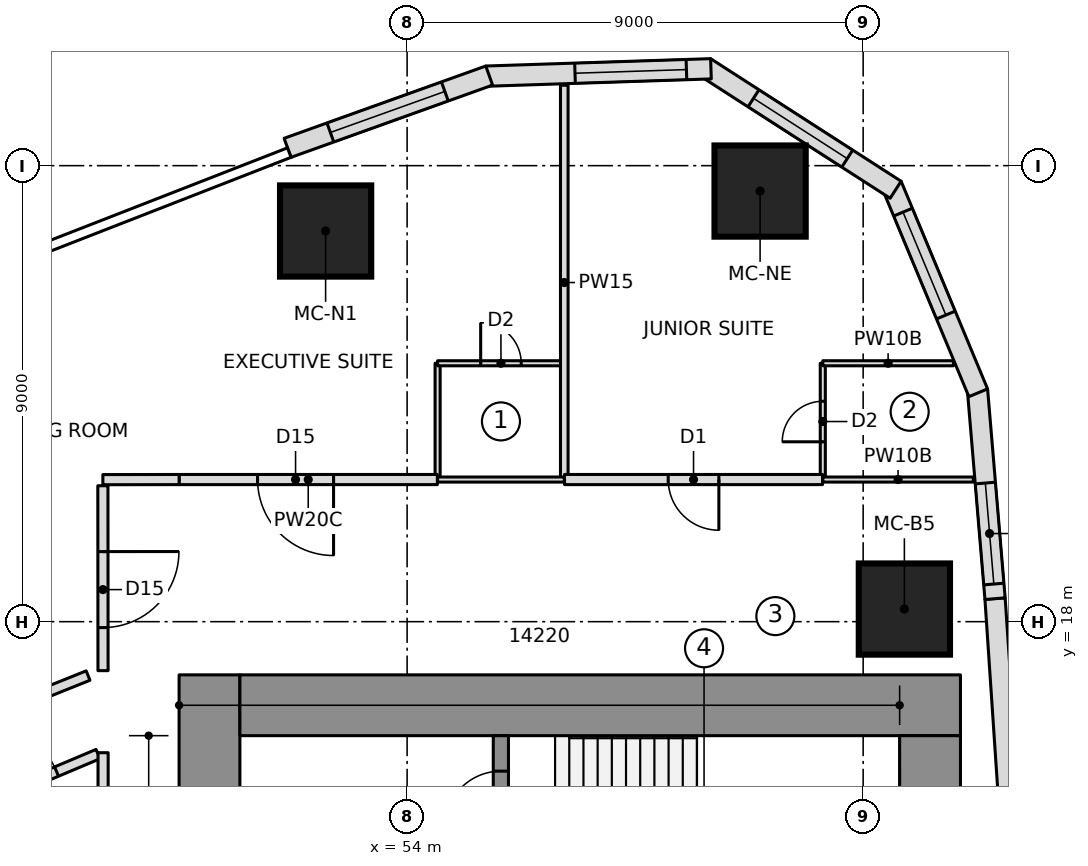
"""IFC4 building model, lengths in metres.
Left out: names, types, materials, properties, quantities, classifications, styles, units other than length and angle.
Written with IfcOpenShell. Run it as: python <this file> out.ifc"""

import sys

from ifc_helpers import new_model, si_unit, direction, frame, frame_2d, origin, origin_2d, place, context, subcontext, project, spatial, polyline, rectangle, outline, extrude, element, fill, save


model = new_model("IFC4")
c1 = context("Model", 3, precision=1e-05, world=origin(), true_north=direction((0.0, 1.0)))
c2 = subcontext(c1, "Body", "Model", "MODEL_VIEW")
j1 = project(units=[si_unit("LENGTHUNIT", "METRE"), si_unit("PLANEANGLEUNIT", "RADIAN")], contexts=[c1])
p1 = place(None, origin())
s1 = spatial("IfcSite", under=j1, at=p1, CompositionType="ELEMENT")
p2 = place(p1, origin())
s2 = spatial("IfcBuilding", under=s1, at=p2, CompositionType="ELEMENT")
p3 = place(p2, frame((0.0, 0.0, 46.7)))
s3 = spatial("IfcBuildingStorey", under=s2, at=p3, CompositionType="ELEMENT", Elevation=46.7)
p4 = place(p3, frame((50.1, 6.65, 0.0), z_axis=(0.0, 0.0, 1.0), x_axis=(0.0, 1.0, 0.0)))
e1 = element("IfcWall", 1, at=p4, inside=s3, PredefinedType="SHEAR", context=c2, shape_type="SweptSolid", body=[
    extrude(rectangle(XDim=10.3, YDim=1.2, at=frame_2d((5.15, 0.0))), origin(), (0.0, 0.0, 1.0), 3.55),
])
p5 = place(p4, frame((6.5, 0.0, 0.0)))
e2 = element("IfcOpeningElement", 2, at=p5, cuts=e1, PredefinedType="OPENING", context=c2, shape_type="SweptSolid", body=[
    extrude(rectangle(XDim=1.1, YDim=2.1, at=frame_2d((0.55, 1.05))), frame((0.0, 0.61, 0.0), z_axis=(0.0, -1.0, 0.0), x_axis=(1.0, 0.0, 0.0)), (0.0, 0.0, 1.0), 1.22),
])
p6 = place(p3, frame((50.7, 16.35, 0.0), z_axis=(0.0, 0.0, 1.0), x_axis=(1.0, 0.0, 0.0)))
e3 = element("IfcWall", 3, at=p6, inside=s3, PredefinedType="SHEAR", context=c2, shape_type="SweptSolid", body=[
    extrude(rectangle(XDim=14.22, YDim=1.2, at=frame_2d((7.11, 0.0))), origin(), (0.0, 0.0, 1.0), 3.55),
])
p7 = place(p3, frame((64.32, 9.95, 0.0), z_axis=(0.0, 0.0, 1.0), x_axis=(0.0, 1.0, 0.0)))
e4 = element("IfcWall", 4, at=p7, inside=s3, PredefinedType="SHEAR", context=c2, shape_type="SweptSolid", body=[
    extrude(rectangle(XDim=5.8, YDim=1.2, at=frame_2d((2.9, 0.0))), origin(), (0.0, 0.0, 1.0), 3.55),
])
p8 = place(p3, frame((55.85, 10.35, 0.0), z_axis=(0.0, 0.0, 1.0), x_axis=(0.0, 1.0, 0.0)))
e5 = element("IfcWall", 5, at=p8, inside=s3, PredefinedType="SHEAR", context=c2, shape_type="SweptSolid", body=[
    extrude(rectangle(XDim=5.4, YDim=0.3, at=frame_2d((2.7, 0.0))), origin(), (0.0, 0.0, 1.0), 3.55),
])
p9 = place(p8, frame((1.43, 0.0, 0.0)))
e6 = element("IfcOpeningElement", 6, at=p9, cuts=e5, PredefinedType="OPENING", context=c2, shape_type="SweptSolid", body=[
    extrude(rectangle(XDim=1.1, YDim=2.1, at=frame_2d((0.55, 1.05))), frame((0.0, 0.16, 0.0), z_axis=(0.0, -1.0, 0.0), x_axis=(1.0, 0.0, 0.0)), (0.0, 0.0, 1.0), 0.32),
])
p10 = place(p8, frame((3.6, 0.0, 0.0)))
e7 = element("IfcOpeningElement", 7, at=p10, cuts=e5, PredefinedType="OPENING", context=c2, shape_type="SweptSolid", body=[
    extrude(rectangle(XDim=1.1, YDim=2.1, at=frame_2d((0.55, 1.05))), frame((0.0, 0.16, 0.0), z_axis=(0.0, -1.0, 0.0), x_axis=(1.0, 0.0, 0.0)), (0.0, 0.0, 1.0), 0.32),
])
for number, where, z_axis, x_axis in (
    (8, (63.813, 18.249, 0.0), (0.0, 0.0, 1.0), (1.0, 0.0, 0.0)),
    (9, (60.966, 26.499, 0.0), (0.0, 0.0, 1.0), (1.0, 0.0, 0.0)),
    (10, (52.392, 25.71, 0.0), (0.0, 0.0, 1.0), (1.0, 0.0, 0.0)),
):
    element("IfcColumn", number, at=place(p3, frame(where, z_axis=z_axis, x_axis=x_axis)), inside=s3, PredefinedType="COLUMN", context=c2, shape_type="SweptSolid", body=[
        extrude(rectangle(XDim=1.8, YDim=1.8, at=origin_2d()), origin(), (0.0, 0.0, 1.0), 3.55),
    ])
p11 = place(p3, frame((65.878, 14.36, 0.0), z_axis=(0.0, 0.0, 1.0), x_axis=(-0.067087430225, 0.997747100575, 0.0)))
e11 = element("IfcWall", 11, at=p11, inside=s3, PredefinedType="NOTDEFINED", context=c2, shape_type="SweptSolid", body=[
    extrude(outline(polyline([(-0.002, -0.2), (4.107, -0.2), (4.103, 0.2), (0.002, 0.2), (-0.002, -0.2)])), origin(), (0.0, 0.0, 1.0), 3.25),
])
p12 = place(p3, frame((65.603, 18.455, 0.0), z_axis=(0.0, 0.0, 1.0), x_axis=(-0.083793550906, 0.996483136248, 0.0)))
e12 = element("IfcWall", 12, at=p12, inside=s3, PredefinedType="NOTDEFINED", context=c2, shape_type="SweptSolid", body=[
    extrude(outline(polyline([(-0.002, -0.2), (4.136, -0.2), (4.074, 0.2), (0.002, 0.2), (-0.002, -0.2)])), origin(), (0.0, 0.0, 1.0), 3.25),
])
p13 = place(p12, frame((0.288, 0.0, 0.5)))
e13 = element("IfcOpeningElement", 13, at=p13, cuts=e12, PredefinedType="OPENING", context=c2, shape_type="SweptSolid", body=[
    extrude(rectangle(XDim=2.0, YDim=2.0, at=frame_2d((1.0, 1.0))), frame((0.0, 0.21, 0.0), z_axis=(0.0, -1.0, 0.0), x_axis=(1.0, 0.0, 0.0)), (0.0, 0.0, 1.0), 0.42),
])
p14 = place(p3, frame((65.259, 22.546, 0.0), z_axis=(0.0, 0.0, 1.0), x_axis=(-0.384372042685, 0.923178277908, 0.0)))
e14 = element("IfcWall", 14, at=p14, inside=s3, PredefinedType="NOTDEFINED", context=c2, shape_type="SweptSolid", body=[
    extrude(outline(polyline([(-0.031, -0.2), (4.408, -0.2), (4.283, 0.2), (0.031, 0.2), (-0.031, -0.2)])), origin(), (0.0, 0.0, 1.0), 3.25),
])
p15 = place(p14, frame((1.631, 0.0, 0.6)))
e15 = element("IfcOpeningElement", 15, at=p15, cuts=e14, PredefinedType="OPENING", context=c2, shape_type="SweptSolid", body=[
    extrude(outline(polyline([(0.0, 1.35), (0.084, 1.771), (0.322, 2.128), (0.679, 2.366), (1.1, 2.45), (1.521, 2.366), (1.878, 2.128), (2.116, 1.771), (2.2, 1.35), (2.2, 1.1), (2.116, 0.679), (1.878, 0.322), (1.521, 0.084), (1.1, 0.0), (0.679, 0.084), (0.322, 0.322), (0.084, 0.679), (0.0, 1.1), (0.0, 1.35)])), frame((0.0, 0.21, 0.0), z_axis=(0.0, -1.0, 0.0), x_axis=(1.0, 0.0, 0.0)), (0.0, 0.0, 1.0), 0.42),
])
p16 = place(p3, frame((63.588, 26.558, 0.0), z_axis=(0.0, 0.0, 1.0), x_axis=(-0.840937468718, 0.541132307025, 0.0)))
e16 = element("IfcWall", 16, at=p16, inside=s3, PredefinedType="NOTDEFINED", context=c2, shape_type="SweptSolid", body=[
    extrude(outline(polyline([(-0.062, -0.2), (4.409, -0.2), (4.284, 0.2), (0.062, 0.2), (-0.062, -0.2)])), origin(), (0.0, 0.0, 1.0), 3.25),
])
p17 = place(p16, frame((1.073, 0.0, 0.6)))
e17 = element("IfcOpeningElement", 17, at=p17, cuts=e16, PredefinedType="OPENING", context=c2, shape_type="SweptSolid", body=[
    extrude(outline(polyline([(0.0, 1.35), (0.084, 1.771), (0.322, 2.128), (0.679, 2.366), (1.1, 2.45), (1.521, 2.366), (1.878, 2.128), (2.116, 1.771), (2.2, 1.35), (2.2, 1.1), (2.116, 0.679), (1.878, 0.322), (1.521, 0.084), (1.1, 0.0), (0.679, 0.084), (0.322, 0.322), (0.084, 0.679), (0.0, 1.1), (0.0, 1.35)])), frame((0.0, 0.21, 0.0), z_axis=(0.0, -1.0, 0.0), x_axis=(1.0, 0.0, 0.0)), (0.0, 0.0, 1.0), 0.42),
])
p18 = place(p3, frame((59.934, 28.91, 0.0), z_axis=(0.0, 0.0, 1.0), x_axis=(-0.999463576228, -0.032749958686, 0.0)))
e18 = element("IfcWall", 18, at=p18, inside=s3, PredefinedType="NOTDEFINED", context=c2, shape_type="SweptSolid", body=[
    extrude(outline(polyline([(-0.062, -0.2), (4.378, -0.2), (4.315, 0.2), (0.062, 0.2), (-0.062, -0.2)])), origin(), (0.0, 0.0, 1.0), 3.25),
])
p19 = place(p18, frame((0.422, 0.0, 0.6)))
e19 = element("IfcOpeningElement", 19, at=p19, cuts=e18, PredefinedType="OPENING", context=c2, shape_type="SweptSolid", body=[
    extrude(outline(polyline([(0.0, 1.35), (0.084, 1.771), (0.322, 2.128), (0.679, 2.366), (1.1, 2.45), (1.521, 2.366), (1.878, 2.128), (2.116, 1.771), (2.2, 1.35), (2.2, 1.1), (2.116, 0.679), (1.878, 0.322), (1.521, 0.084), (1.1, 0.0), (0.679, 0.084), (0.322, 0.322), (0.084, 0.679), (0.0, 1.1), (0.0, 1.35)])), frame((0.0, 0.21, 0.0), z_axis=(0.0, -1.0, 0.0), x_axis=(1.0, 0.0, 0.0)), (0.0, 0.0, 1.0), 0.42),
])
p20 = place(p3, frame((55.59, 28.768, 0.0), z_axis=(0.0, 0.0, 1.0), x_axis=(-0.941339752885, -0.337460323057, 0.0)))
e20 = element("IfcWall", 20, at=p20, inside=s3, PredefinedType="NOTDEFINED", context=c2, shape_type="SweptSolid", body=[
    extrude(outline(polyline([(-0.031, -0.2), (4.196, -0.2), (4.196, 0.2), (0.031, 0.2), (-0.031, -0.2)])), origin(), (0.0, 0.0, 1.0), 3.25),
])
p21 = place(p20, frame((0.898, 0.0, 0.5)))
e21 = element("IfcOpeningElement", 21, at=p21, cuts=e20, PredefinedType="OPENING", context=c2, shape_type="SweptSolid", body=[
    extrude(rectangle(XDim=2.4, YDim=2.0, at=frame_2d((1.2, 1.0))), frame((0.0, 0.21, 0.0), z_axis=(0.0, -1.0, 0.0), x_axis=(1.0, 0.0, 0.0)), (0.0, 0.0, 1.0), 0.42),
])
p22 = place(p3, frame((54.602, 20.8, 0.0), z_axis=(0.0, 0.0, 1.0), x_axis=(0.0, 1.0, 0.0)))
e22 = element("IfcWall", 22, at=p22, inside=s3, PredefinedType="PARTITIONING", context=c2, shape_type="SweptSolid", body=[
    extrude(rectangle(XDim=2.3, YDim=0.1, at=frame_2d((1.15, 0.0))), origin(), (0.0, 0.0, 1.0), 3.25),
])
p23 = place(p3, frame((54.602, 23.1, 0.0), z_axis=(0.0, 0.0, 1.0), x_axis=(1.0, 0.0, 0.0)))
e23 = element("IfcWall", 23, at=p23, inside=s3, PredefinedType="PARTITIONING", context=c2, shape_type="SweptSolid", body=[
    extrude(rectangle(XDim=2.5, YDim=0.1, at=frame_2d((1.25, 0.0))), origin(), (0.0, 0.0, 1.0), 3.25),
])
p24 = place(p23, frame((0.85, 0.0, 0.0)))
e24 = element("IfcOpeningElement", 24, at=p24, cuts=e23, PredefinedType="OPENING", context=c2, shape_type="SweptSolid", body=[
    extrude(rectangle(XDim=0.8, YDim=2.1, at=frame_2d((0.4, 1.05))), frame((0.0, 0.06, 0.0), z_axis=(0.0, -1.0, 0.0), x_axis=(1.0, 0.0, 0.0)), (0.0, 0.0, 1.0), 0.12),
])
p25 = place(p3, frame((62.203, 20.8, 0.0), z_axis=(0.0, 0.0, 1.0), x_axis=(0.0, 1.0, 0.0)))
e25 = element("IfcWall", 25, at=p25, inside=s3, PredefinedType="PARTITIONING", context=c2, shape_type="SweptSolid", body=[
    extrude(rectangle(XDim=2.3, YDim=0.1, at=frame_2d((1.15, 0.0))), origin(), (0.0, 0.0, 1.0), 3.25),
])
p26 = place(p25, frame((0.75, 0.0, 0.0)))
e26 = element("IfcOpeningElement", 26, at=p26, cuts=e25, PredefinedType="OPENING", context=c2, shape_type="SweptSolid", body=[
    extrude(rectangle(XDim=0.8, YDim=2.1, at=frame_2d((0.4, 1.05))), frame((0.0, 0.06, 0.0), z_axis=(0.0, -1.0, 0.0), x_axis=(1.0, 0.0, 0.0)), (0.0, 0.0, 1.0), 0.12),
])
p27 = place(p3, frame((62.203, 23.1, 0.0), z_axis=(0.0, 0.0, 1.0), x_axis=(1.0, 0.0, 0.0)))
e27 = element("IfcWall", 27, at=p27, inside=s3, PredefinedType="PARTITIONING", context=c2, shape_type="SweptSolid", body=[
    extrude(rectangle(XDim=2.578, YDim=0.1, at=frame_2d((1.289, 0.0))), origin(), (0.0, 0.0, 1.0), 3.25),
])
p28 = place(p3, frame((57.102, 20.8, 0.0), z_axis=(0.0, 0.0, 1.0), x_axis=(0.0, 1.0, 0.0)))
e28 = element("IfcWall", 28, at=p28, inside=s3, PredefinedType="PARTITIONING", context=c2, shape_type="SweptSolid", body=[
    extrude(rectangle(XDim=7.787, YDim=0.15, at=frame_2d((3.894, 0.0))), origin(), (0.0, 0.0, 1.0), 3.25),
])
p29 = place(p3, frame((43.85, 13.677, 0.0), z_axis=(0.0, 0.0, 1.0), x_axis=(0.921265924084, 0.388933281068, 0.0)))
e29 = element("IfcWall", 29, at=p29, inside=s3, PredefinedType="PARTITIONING", context=c2, shape_type="SweptSolid", body=[
    extrude(rectangle(XDim=4.396, YDim=0.2, at=frame_2d((2.198, 0.0))), origin(), (0.0, 0.0, 1.0), 3.25),
])
p30 = place(p29, frame((1.508, 0.0, 0.0)))
e30 = element("IfcOpeningElement", 30, at=p30, cuts=e29, PredefinedType="OPENING", context=c2, shape_type="SweptSolid", body=[
    extrude(rectangle(XDim=2.0, YDim=2.4, at=frame_2d((1.0, 1.2))), frame((0.0, 0.11, 0.0), z_axis=(0.0, -1.0, 0.0), x_axis=(1.0, 0.0, 0.0)), (0.0, 0.0, 1.0), 0.22),
])
p31 = place(p3, frame((54.597, 20.805, 0.0), z_axis=(0.0, 0.0, 1.0), x_axis=(-1.0, 0.0, 0.0)))
e31 = element("IfcWall", 31, at=p31, inside=s3, PredefinedType="PARTITIONING", context=c2, shape_type="SweptSolid", body=[
    extrude(rectangle(XDim=5.097, YDim=0.2, at=frame_2d((2.548, 0.0))), origin(), (0.0, 0.0, 1.0), 3.25),
])
p32 = place(p31, frame((2.048, 0.0, 0.0)))
e32 = element("IfcOpeningElement", 32, at=p32, cuts=e31, PredefinedType="OPENING", context=c2, shape_type="SweptSolid", body=[
    extrude(rectangle(XDim=1.5, YDim=2.1, at=frame_2d((0.75, 1.05))), frame((0.0, 0.11, 0.0), z_axis=(0.0, -1.0, 0.0), x_axis=(1.0, 0.0, 0.0)), (0.0, 0.0, 1.0), 0.22),
])
p33 = place(p3, frame((62.198, 20.805, 0.0), z_axis=(0.0, 0.0, 1.0), x_axis=(-1.0, 0.0, 0.0)))
e33 = element("IfcWall", 33, at=p33, inside=s3, PredefinedType="PARTITIONING", context=c2, shape_type="SweptSolid", body=[
    extrude(rectangle(XDim=5.092, YDim=0.2, at=frame_2d((2.546, 0.0))), origin(), (0.0, 0.0, 1.0), 3.25),
])
p34 = place(p33, frame((2.046, 0.0, 0.0)))
e34 = element("IfcOpeningElement", 34, at=p34, cuts=e33, PredefinedType="OPENING", context=c2, shape_type="SweptSolid", body=[
    extrude(rectangle(XDim=1.0, YDim=2.1, at=frame_2d((0.5, 1.05))), frame((0.0, 0.11, 0.0), z_axis=(0.0, -1.0, 0.0), x_axis=(1.0, 0.0, 0.0)), (0.0, 0.0, 1.0), 0.22),
])
p35 = place(p3, frame((57.102, 20.805, 0.0), z_axis=(0.0, 0.0, 1.0), x_axis=(-1.0, 0.0, 0.0)))
e35 = element("IfcWall", 35, at=p35, inside=s3, PredefinedType="PARTITIONING", context=c2, shape_type="SweptSolid", body=[
    extrude(rectangle(XDim=2.5, YDim=0.1, at=frame_2d((1.25, 0.0))), origin(), (0.0, 0.0, 1.0), 3.25),
])
p36 = place(p3, frame((65.175, 20.805, 0.0), z_axis=(0.0, 0.0, 1.0), x_axis=(-1.0, 0.0, 0.0)))
e36 = element("IfcWall", 36, at=p36, inside=s3, PredefinedType="PARTITIONING", context=c2, shape_type="SweptSolid", body=[
    extrude(rectangle(XDim=2.971, YDim=0.1, at=frame_2d((1.486, 0.0))), origin(), (0.0, 0.0, 1.0), 3.25),
])
p37 = place(p3, frame((47.704, 16.936, 0.0), z_axis=(0.0, 0.0, 1.0), x_axis=(-0.927985537407, -0.372616213232, 0.0)))
e37 = element("IfcWall", 37, at=p37, inside=s3, PredefinedType="PARTITIONING", context=c2, shape_type="SweptSolid", body=[
    extrude(rectangle(XDim=0.927, YDim=0.2, at=frame_2d((0.463, 0.0))), origin(), (0.0, 0.0, 1.0), 3.25),
])
p38 = place(p3, frame((48.0, 15.414, 0.0), z_axis=(0.0, 0.0, 1.0), x_axis=(0.0, -1.0, 0.0)))
e38 = element("IfcWall", 38, at=p38, inside=s3, PredefinedType="PARTITIONING", context=c2, shape_type="SweptSolid", body=[
    extrude(rectangle(XDim=30.828, YDim=0.2, at=frame_2d((15.414, 0.0))), origin(), (0.0, 0.0, 1.0), 3.25),
])
p39 = place(p3, frame((49.5, 20.805, 0.0), z_axis=(0.0, 0.0, 1.0), x_axis=(-0.999998933031, -0.001460800259, 0.0)))
e39 = element("IfcWall", 39, at=p39, inside=s3, PredefinedType="PARTITIONING", context=c2, shape_type="SweptSolid", body=[
    extrude(rectangle(XDim=1.504, YDim=0.2, at=frame_2d((0.752, 0.0))), origin(), (0.0, 0.0, 1.0), 3.25),
])
p40 = place(p3, frame((47.996, 20.683, 0.0), z_axis=(0.0, 0.0, 1.0), x_axis=(0.000802729021, -0.999999677813, 0.0)))
e40 = element("IfcWall", 40, at=p40, inside=s3, PredefinedType="PARTITIONING", context=c2, shape_type="SweptSolid", body=[
    extrude(rectangle(XDim=3.65, YDim=0.2, at=frame_2d((1.825, 0.0))), origin(), (0.0, 0.0, 1.0), 3.25),
])
p41 = place(p40, frame((1.3, 0.0, 0.0)))
e41 = element("IfcOpeningElement", 41, at=p41, cuts=e40, PredefinedType="OPENING", context=c2, shape_type="SweptSolid", body=[
    extrude(rectangle(XDim=1.5, YDim=2.1, at=frame_2d((0.75, 1.05))), frame((0.0, 0.11, 0.0), z_axis=(0.0, -1.0, 0.0), x_axis=(1.0, 0.0, 0.0)), (0.0, 0.0, 1.0), 0.22),
])
p42 = place(p13, origin())
e42 = element("IfcWindow", 42, at=p42, inside=s3, PartitioningType="SINGLE_PANEL", PredefinedType="WINDOW", context=c2, shape_type="SweptSolid", body=[
    extrude(rectangle(XDim=2.0, YDim=2.0, at=frame_2d((1.0, 1.0))), frame((0.0, 0.17, 0.0), z_axis=(0.0, -1.0, 0.0), x_axis=(1.0, 0.0, 0.0)), (0.0, 0.0, 1.0), 0.06),
])
fill(e13, e42)
p43 = place(p15, origin())
e43 = element("IfcWindow", 43, at=p43, inside=s3, PartitioningType="SINGLE_PANEL", PredefinedType="WINDOW", context=c2, shape_type="SweptSolid", body=[
    extrude(outline(polyline([(0.0, 1.35), (0.084, 1.771), (0.322, 2.128), (0.679, 2.366), (1.1, 2.45), (1.521, 2.366), (1.878, 2.128), (2.116, 1.771), (2.2, 1.35), (2.2, 1.1), (2.116, 0.679), (1.878, 0.322), (1.521, 0.084), (1.1, 0.0), (0.679, 0.084), (0.322, 0.322), (0.084, 0.679), (0.0, 1.1), (0.0, 1.35)])), frame((0.0, 0.17, 0.0), z_axis=(0.0, -1.0, 0.0), x_axis=(1.0, 0.0, 0.0)), (0.0, 0.0, 1.0), 0.06),
])
fill(e15, e43)
p44 = place(p17, origin())
e44 = element("IfcWindow", 44, at=p44, inside=s3, PartitioningType="SINGLE_PANEL", PredefinedType="WINDOW", context=c2, shape_type="SweptSolid", body=[
    extrude(outline(polyline([(0.0, 1.35), (0.084, 1.771), (0.322, 2.128), (0.679, 2.366), (1.1, 2.45), (1.521, 2.366), (1.878, 2.128), (2.116, 1.771), (2.2, 1.35), (2.2, 1.1), (2.116, 0.679), (1.878, 0.322), (1.521, 0.084), (1.1, 0.0), (0.679, 0.084), (0.322, 0.322), (0.084, 0.679), (0.0, 1.1), (0.0, 1.35)])), frame((0.0, 0.17, 0.0), z_axis=(0.0, -1.0, 0.0), x_axis=(1.0, 0.0, 0.0)), (0.0, 0.0, 1.0), 0.06),
])
fill(e17, e44)
p45 = place(p19, origin())
e45 = element("IfcWindow", 45, at=p45, inside=s3, PartitioningType="SINGLE_PANEL", PredefinedType="WINDOW", context=c2, shape_type="SweptSolid", body=[
    extrude(outline(polyline([(0.0, 1.35), (0.084, 1.771), (0.322, 2.128), (0.679, 2.366), (1.1, 2.45), (1.521, 2.366), (1.878, 2.128), (2.116, 1.771), (2.2, 1.35), (2.2, 1.1), (2.116, 0.679), (1.878, 0.322), (1.521, 0.084), (1.1, 0.0), (0.679, 0.084), (0.322, 0.322), (0.084, 0.679), (0.0, 1.1), (0.0, 1.35)])), frame((0.0, 0.17, 0.0), z_axis=(0.0, -1.0, 0.0), x_axis=(1.0, 0.0, 0.0)), (0.0, 0.0, 1.0), 0.06),
])
fill(e19, e45)
p46 = place(p21, origin())
e46 = element("IfcWindow", 46, at=p46, inside=s3, PartitioningType="SINGLE_PANEL", PredefinedType="WINDOW", context=c2, shape_type="SweptSolid", body=[
    extrude(rectangle(XDim=2.4, YDim=2.0, at=frame_2d((1.2, 1.0))), frame((0.0, 0.17, 0.0), z_axis=(0.0, -1.0, 0.0), x_axis=(1.0, 0.0, 0.0)), (0.0, 0.0, 1.0), 0.06),
])
fill(e21, e46)
p47 = place(p24, origin())
e47 = element("IfcDoor", 47, at=p47, inside=s3, OperationType="SINGLE_SWING_LEFT", PredefinedType="DOOR", context=c2, shape_type="SweptSolid", body=[
    extrude(rectangle(XDim=0.8, YDim=2.1, at=frame_2d((0.4, 1.05))), frame((0.0, 0.025, 0.0), z_axis=(0.0, -1.0, 0.0), x_axis=(1.0, 0.0, 0.0)), (0.0, 0.0, 1.0), 0.05),
])
fill(e24, e47)
p48 = place(p26, origin())
e48 = element("IfcDoor", 48, at=p48, inside=s3, OperationType="SINGLE_SWING_LEFT", PredefinedType="DOOR", context=c2, shape_type="SweptSolid", body=[
    extrude(rectangle(XDim=0.8, YDim=2.1, at=frame_2d((0.4, 1.05))), frame((0.0, 0.025, 0.0), z_axis=(0.0, -1.0, 0.0), x_axis=(1.0, 0.0, 0.0)), (0.0, 0.0, 1.0), 0.05),
])
fill(e26, e48)
p49 = place(p30, origin())
e49 = element("IfcDoor", 49, at=p49, inside=s3, OperationType="DOUBLE_DOOR_SINGLE_SWING", PredefinedType="DOOR", context=c2, shape_type="SweptSolid", body=[
    extrude(rectangle(XDim=2.0, YDim=2.4, at=frame_2d((1.0, 1.2))), frame((0.0, 0.025, 0.0), z_axis=(0.0, -1.0, 0.0), x_axis=(1.0, 0.0, 0.0)), (0.0, 0.0, 1.0), 0.05),
])
fill(e30, e49)
p50 = place(p32, origin())
e50 = element("IfcDoor", 50, at=p50, inside=s3, OperationType="DOUBLE_DOOR_SINGLE_SWING", PredefinedType="DOOR", context=c2, shape_type="SweptSolid", body=[
    extrude(rectangle(XDim=1.5, YDim=2.1, at=frame_2d((0.75, 1.05))), frame((0.0, 0.025, 0.0), z_axis=(0.0, -1.0, 0.0), x_axis=(1.0, 0.0, 0.0)), (0.0, 0.0, 1.0), 0.05),
])
fill(e32, e50)
p51 = place(p34, origin())
e51 = element("IfcDoor", 51, at=p51, inside=s3, OperationType="SINGLE_SWING_LEFT", PredefinedType="DOOR", context=c2, shape_type="SweptSolid", body=[
    extrude(rectangle(XDim=1.0, YDim=2.1, at=frame_2d((0.5, 1.05))), frame((0.0, 0.025, 0.0), z_axis=(0.0, -1.0, 0.0), x_axis=(1.0, 0.0, 0.0)), (0.0, 0.0, 1.0), 0.05),
])
fill(e34, e51)
p52 = place(p41, origin())
e52 = element("IfcDoor", 52, at=p52, inside=s3, OperationType="DOUBLE_DOOR_SINGLE_SWING", PredefinedType="DOOR", context=c2, shape_type="SweptSolid", body=[
    extrude(rectangle(XDim=1.5, YDim=2.1, at=frame_2d((0.75, 1.05))), frame((0.0, 0.025, 0.0), z_axis=(0.0, -1.0, 0.0), x_axis=(1.0, 0.0, 0.0)), (0.0, 0.0, 1.0), 0.05),
])
fill(e41, e52)
p53 = place(p10, origin())
e53 = element("IfcDoor", 53, at=p53, inside=s3, OperationType="SINGLE_SWING_RIGHT", PredefinedType="DOOR", context=c2, shape_type="SweptSolid", body=[
    extrude(rectangle(XDim=1.1, YDim=2.1, at=frame_2d((0.55, 1.05))), frame((0.0, 0.025, 0.0), z_axis=(0.0, -1.0, 0.0), x_axis=(1.0, 0.0, 0.0)), (0.0, 0.0, 1.0), 0.05),
])
fill(e7, e53)
save(model, sys.argv[1])
